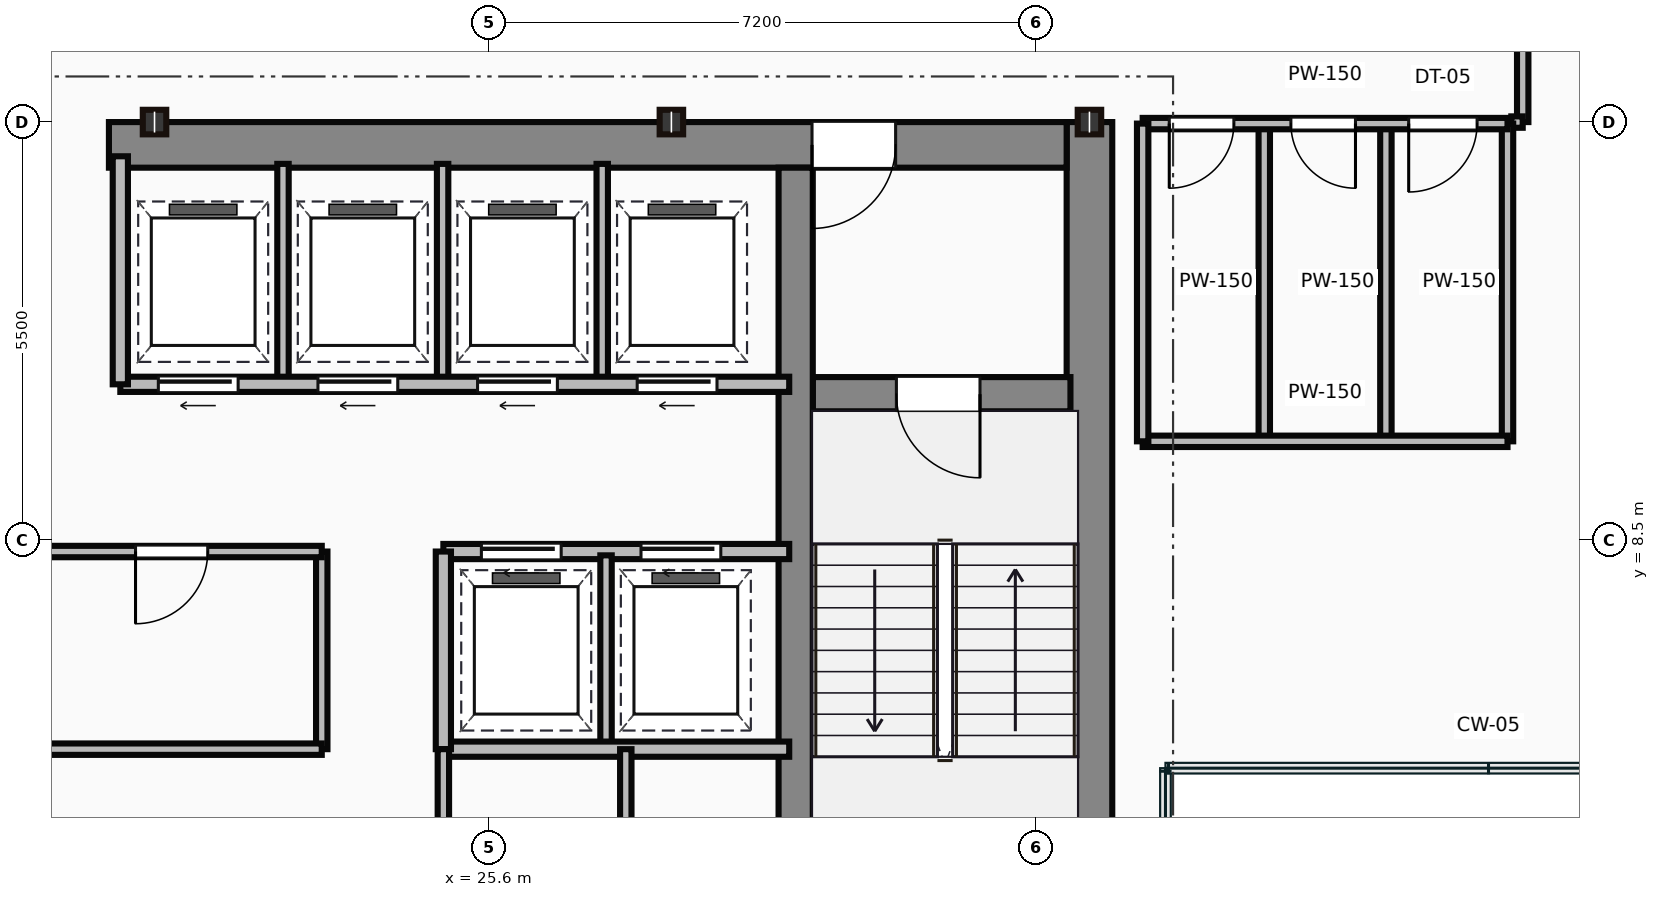
"""IFC4 building model, lengths in metres.
Left out: names, types, materials, properties, quantities, classifications, styles, units other than length and angle.
Written with IfcOpenShell. Run it as: python <this file> out.ifc"""

import sys

from ifc_helpers import new_model, si_unit, direction, frame, frame_2d, origin, origin_2d, place, context, subcontext, project, spatial, rectangle, i_section, extrude, source, transform, mapped, element, fill, save


model = new_model("IFC4")
c1 = context("Model", 3, precision=1e-05, world=origin(), true_north=direction((0.0, 1.0)))
c2 = subcontext(c1, "Body", "Model", "MODEL_VIEW")
j1 = project(units=[si_unit("LENGTHUNIT", "METRE"), si_unit("PLANEANGLEUNIT", "RADIAN")], contexts=[c1])
p1 = place(None, origin())
s1 = spatial("IfcSite", under=j1, at=p1, CompositionType="ELEMENT")
p2 = place(p1, origin())
s2 = spatial("IfcBuilding", under=s1, at=p2, CompositionType="ELEMENT")
p3 = place(p2, frame((0.0, 0.0, 269.75)))
s3 = spatial("IfcBuildingStorey", under=s2, at=p3, CompositionType="ELEMENT", Elevation=269.75)
m1 = source(origin(), c2, "Body", "SweptSolid", [
    extrude(rectangle(XDim=13.1, YDim=0.6, at=frame_2d((6.55, 0.0))), origin(), (0.0, 0.0, 1.0), 3.65),
])
p4 = place(p3, frame((33.5, 0.9, 0.0), z_axis=(0.0, 0.0, 1.0), x_axis=(0.0, 1.0, 0.0)))
e1 = element("IfcWall", 1, at=p4, inside=s3, PredefinedType="SHEAR", context=c2, shape_type="MappedRepresentation", body=[
    mapped(m1, transform((0.0, 0.0, 0.0))),
])
m2 = source(origin(), c2, "Body", "SweptSolid", [
    extrude(rectangle(XDim=12.6, YDim=0.6, at=frame_2d((6.3, 0.0))), origin(), (0.0, 0.0, 1.0), 3.65),
])
p5 = place(p3, frame((20.6, 13.7, 0.0), z_axis=(0.0, 0.0, 1.0), x_axis=(1.0, 0.0, 0.0)))
e2 = element("IfcWall", 2, at=p5, inside=s3, PredefinedType="SHEAR", context=c2, shape_type="MappedRepresentation", body=[
    mapped(m2, transform((0.0, 0.0, 0.0))),
])
p6 = place(p5, frame((9.25, 0.0, 0.0)))
e3 = element("IfcOpeningElement", 3, at=p6, cuts=e2, PredefinedType="OPENING", context=c2, shape_type="SweptSolid", body=[
    extrude(rectangle(XDim=1.1, YDim=2.15, at=frame_2d((0.55, 1.075))), frame((0.0, 0.31, 0.0), z_axis=(0.0, -1.0, 0.0), x_axis=(1.0, 0.0, 0.0)), (0.0, 0.0, 1.0), 0.62),
])
m3 = source(origin(), c2, "Body", "SweptSolid", [
    extrude(rectangle(XDim=12.5, YDim=0.45, at=frame_2d((6.25, 0.0))), origin(), (0.0, 0.0, 1.0), 3.65),
])
p7 = place(p3, frame((29.635, 0.9, 0.0), z_axis=(0.0, 0.0, 1.0), x_axis=(0.0, 1.0, 0.0)))
e4 = element("IfcWall", 4, at=p7, inside=s3, PredefinedType="SHEAR", context=c2, shape_type="MappedRepresentation", body=[
    mapped(m3, transform((0.0, 0.0, 0.0))),
])
m4 = source(origin(), c2, "Body", "SweptSolid", [
    extrude(rectangle(XDim=3.39, YDim=0.45, at=frame_2d((1.695, 0.0))), origin(), (0.0, 0.0, 1.0), 3.65),
])
p8 = place(p3, frame((29.86, 10.42, 0.0), z_axis=(0.0, 0.0, 1.0), x_axis=(1.0, 0.0, 0.0)))
e5 = element("IfcWall", 5, at=p8, inside=s3, PredefinedType="SHEAR", context=c2, shape_type="MappedRepresentation", body=[
    mapped(m4, transform((0.0, 0.0, 0.0))),
])
p9 = place(p8, frame((1.1, 0.0, 0.0)))
e6 = element("IfcOpeningElement", 6, at=p9, cuts=e5, PredefinedType="OPENING", context=c2, shape_type="SweptSolid", body=[
    extrude(rectangle(XDim=1.1, YDim=2.15, at=frame_2d((0.55, 1.075))), frame((0.0, 0.235, 0.0), z_axis=(0.0, -1.0, 0.0), x_axis=(1.0, 0.0, 0.0)), (0.0, 0.0, 1.0), 0.47),
])
m5 = source(origin(), c2, "Body", "SweptSolid", [
    extrude(i_section(OverallWidth=0.309, OverallDepth=0.323, WebThickness=0.014, FlangeThickness=0.023, at=origin_2d()), origin(), (0.0, 0.0, 1.0), 3.65),
])
for number, where, z_axis, x_axis in (
    (7, (21.2, 14.0, 0.0), (0.0, 0.0, 1.0), (1.0, 0.0, 0.0)),
    (8, (28.0, 14.0, 0.0), (0.0, 0.0, 1.0), (1.0, 0.0, 0.0)),
    (9, (33.5, 14.0, 0.0), (0.0, 0.0, 1.0), (1.0, 0.0, 0.0)),
):
    element("IfcColumn", number, at=place(p3, frame(where, z_axis=z_axis, x_axis=x_axis)), inside=s3, PredefinedType="COLUMN", context=c2, shape_type="MappedRepresentation", body=[
        mapped(m5, transform((0.0, 0.0, 0.0))),
    ])
m6 = source(origin(), c2, "Body", "SweptSolid", [
    extrude(rectangle(XDim=11.85, YDim=0.15, at=frame_2d((5.925, 0.0))), origin(), (0.0, 0.0, 1.0), 3.4),
])
p10 = place(p3, frame((11.55, 5.75, 0.0), z_axis=(0.0, 0.0, 1.0), x_axis=(1.0, 0.0, 0.0)))
e10 = element("IfcWall", 10, at=p10, inside=s3, PredefinedType="PARTITIONING", context=c2, shape_type="MappedRepresentation", body=[
    mapped(m6, transform((0.0, 0.0, 0.0))),
])
p11 = place(p3, frame((11.55, 8.35, 0.0), z_axis=(0.0, 0.0, 1.0), x_axis=(1.0, 0.0, 0.0)))
e11 = element("IfcWall", 11, at=p11, inside=s3, PredefinedType="PARTITIONING", context=c2, shape_type="MappedRepresentation", body=[
    mapped(m6, transform((0.0, 0.0, 0.0))),
])
p12 = place(p11, frame((1.1, 0.0, 0.0)))
e12 = element("IfcOpeningElement", 12, at=p12, cuts=e11, PredefinedType="OPENING", context=c2, shape_type="SweptSolid", body=[
    extrude(rectangle(XDim=0.95, YDim=2.15, at=frame_2d((0.475, 1.075))), frame((0.0, 0.085, 0.0), z_axis=(0.0, -1.0, 0.0), x_axis=(1.0, 0.0, 0.0)), (0.0, 0.0, 1.0), 0.17),
])
p13 = place(p11, frame((9.4, 0.0, 0.0)))
e13 = element("IfcOpeningElement", 13, at=p13, cuts=e11, PredefinedType="OPENING", context=c2, shape_type="SweptSolid", body=[
    extrude(rectangle(XDim=0.95, YDim=2.15, at=frame_2d((0.475, 1.075))), frame((0.0, 0.085, 0.0), z_axis=(0.0, -1.0, 0.0), x_axis=(1.0, 0.0, 0.0)), (0.0, 0.0, 1.0), 0.17),
])
m7 = source(origin(), c2, "Body", "SweptSolid", [
    extrude(rectangle(XDim=2.6, YDim=0.15, at=frame_2d((1.3, 0.0))), origin(), (0.0, 0.0, 1.0), 3.4),
])
p14 = place(p3, frame((23.4, 5.75, 0.0), z_axis=(0.0, 0.0, 1.0), x_axis=(0.0, 1.0, 0.0)))
e14 = element("IfcWall", 14, at=p14, inside=s3, PredefinedType="PARTITIONING", context=c2, shape_type="MappedRepresentation", body=[
    mapped(m7, transform((0.0, 0.0, 0.0))),
])
m8 = source(origin(), c2, "Body", "SweptSolid", [
    extrude(rectangle(XDim=8.8, YDim=0.2, at=frame_2d((4.4, 0.0))), origin(), (0.0, 0.0, 1.0), 3.4),
])
p15 = place(p3, frame((20.75, 10.55, 0.0), z_axis=(0.0, 0.0, 1.0), x_axis=(1.0, 0.0, 0.0)))
e15 = element("IfcWall", 15, at=p15, inside=s3, PredefinedType="PARTITIONING", context=c2, shape_type="MappedRepresentation", body=[
    mapped(m8, transform((0.0, 0.0, 0.0))),
])
p16 = place(p15, frame((0.5, 0.0, 0.0)))
e16 = element("IfcOpeningElement", 16, at=p16, cuts=e15, PredefinedType="OPENING", context=c2, shape_type="SweptSolid", body=[
    extrude(rectangle(XDim=1.05, YDim=2.15, at=frame_2d((0.525, 1.075))), frame((0.0, 0.11, 0.0), z_axis=(0.0, -1.0, 0.0), x_axis=(1.0, 0.0, 0.0)), (0.0, 0.0, 1.0), 0.22),
])
p17 = place(p15, frame((2.6, 0.0, 0.0)))
e17 = element("IfcOpeningElement", 17, at=p17, cuts=e15, PredefinedType="OPENING", context=c2, shape_type="SweptSolid", body=[
    extrude(rectangle(XDim=1.05, YDim=2.15, at=frame_2d((0.525, 1.075))), frame((0.0, 0.11, 0.0), z_axis=(0.0, -1.0, 0.0), x_axis=(1.0, 0.0, 0.0)), (0.0, 0.0, 1.0), 0.22),
])
p18 = place(p15, frame((4.7, 0.0, 0.0)))
e18 = element("IfcOpeningElement", 18, at=p18, cuts=e15, PredefinedType="OPENING", context=c2, shape_type="SweptSolid", body=[
    extrude(rectangle(XDim=1.05, YDim=2.15, at=frame_2d((0.525, 1.075))), frame((0.0, 0.11, 0.0), z_axis=(0.0, -1.0, 0.0), x_axis=(1.0, 0.0, 0.0)), (0.0, 0.0, 1.0), 0.22),
])
p19 = place(p15, frame((6.8, 0.0, 0.0)))
e19 = element("IfcOpeningElement", 19, at=p19, cuts=e15, PredefinedType="OPENING", context=c2, shape_type="SweptSolid", body=[
    extrude(rectangle(XDim=1.05, YDim=2.15, at=frame_2d((0.525, 1.075))), frame((0.0, 0.11, 0.0), z_axis=(0.0, -1.0, 0.0), x_axis=(1.0, 0.0, 0.0)), (0.0, 0.0, 1.0), 0.22),
])
m9 = source(origin(), c2, "Body", "SweptSolid", [
    extrude(rectangle(XDim=3.0, YDim=0.2, at=frame_2d((1.5, 0.0))), origin(), (0.0, 0.0, 1.0), 3.4),
])
p20 = place(p3, frame((20.75, 10.55, 0.0), z_axis=(0.0, 0.0, 1.0), x_axis=(0.0, 1.0, 0.0)))
e20 = element("IfcWall", 20, at=p20, inside=s3, PredefinedType="PARTITIONING", context=c2, shape_type="MappedRepresentation", body=[
    mapped(m9, transform((0.0, 0.0, 0.0))),
])
m10 = source(origin(), c2, "Body", "SweptSolid", [
    extrude(rectangle(XDim=2.85, YDim=0.15, at=frame_2d((1.425, 0.0))), origin(), (0.0, 0.0, 1.0), 3.4),
])
for number, where, z_axis, x_axis in (
    (21, (22.89, 10.6, 0.0), (0.0, 0.0, 1.0), (0.0, 1.0, 0.0)),
    (22, (24.99, 10.6, 0.0), (0.0, 0.0, 1.0), (0.0, 1.0, 0.0)),
    (23, (27.09, 10.6, 0.0), (0.0, 0.0, 1.0), (0.0, 1.0, 0.0)),
):
    element("IfcWall", number, at=place(p3, frame(where, z_axis=z_axis, x_axis=x_axis)), inside=s3, PredefinedType="PARTITIONING", context=c2, shape_type="MappedRepresentation", body=[
        mapped(m10, transform((0.0, 0.0, 0.0))),
    ])
m11 = source(origin(), c2, "Body", "SweptSolid", [
    extrude(rectangle(XDim=4.55, YDim=0.2, at=frame_2d((2.275, 0.0))), origin(), (0.0, 0.0, 1.0), 3.4),
])
p21 = place(p3, frame((25.0, 8.35, 0.0), z_axis=(0.0, 0.0, 1.0), x_axis=(1.0, 0.0, 0.0)))
e24 = element("IfcWall", 24, at=p21, inside=s3, PredefinedType="PARTITIONING", context=c2, shape_type="MappedRepresentation", body=[
    mapped(m11, transform((0.0, 0.0, 0.0))),
])
p22 = place(p21, frame((0.5, 0.0, 0.0)))
e25 = element("IfcOpeningElement", 25, at=p22, cuts=e24, PredefinedType="OPENING", context=c2, shape_type="SweptSolid", body=[
    extrude(rectangle(XDim=1.05, YDim=2.15, at=frame_2d((0.525, 1.075))), frame((0.0, 0.11, 0.0), z_axis=(0.0, -1.0, 0.0), x_axis=(1.0, 0.0, 0.0)), (0.0, 0.0, 1.0), 0.22),
])
p23 = place(p21, frame((2.6, 0.0, 0.0)))
e26 = element("IfcOpeningElement", 26, at=p23, cuts=e24, PredefinedType="OPENING", context=c2, shape_type="SweptSolid", body=[
    extrude(rectangle(XDim=1.05, YDim=2.15, at=frame_2d((0.525, 1.075))), frame((0.0, 0.11, 0.0), z_axis=(0.0, -1.0, 0.0), x_axis=(1.0, 0.0, 0.0)), (0.0, 0.0, 1.0), 0.22),
])
p24 = place(p3, frame((25.0, 5.75, 0.0), z_axis=(0.0, 0.0, 1.0), x_axis=(1.0, 0.0, 0.0)))
e27 = element("IfcWall", 27, at=p24, inside=s3, PredefinedType="PARTITIONING", context=c2, shape_type="MappedRepresentation", body=[
    mapped(m11, transform((0.0, 0.0, 0.0))),
])
m12 = source(origin(), c2, "Body", "SweptSolid", [
    extrude(rectangle(XDim=2.6, YDim=0.2, at=frame_2d((1.3, 0.0))), origin(), (0.0, 0.0, 1.0), 3.4),
])
p25 = place(p3, frame((25.0, 5.75, 0.0), z_axis=(0.0, 0.0, 1.0), x_axis=(0.0, 1.0, 0.0)))
e28 = element("IfcWall", 28, at=p25, inside=s3, PredefinedType="PARTITIONING", context=c2, shape_type="MappedRepresentation", body=[
    mapped(m12, transform((0.0, 0.0, 0.0))),
])
m13 = source(origin(), c2, "Body", "SweptSolid", [
    extrude(rectangle(XDim=2.5, YDim=0.15, at=frame_2d((1.25, 0.0))), origin(), (0.0, 0.0, 1.0), 3.4),
])
p26 = place(p3, frame((27.14, 5.8, 0.0), z_axis=(0.0, 0.0, 1.0), x_axis=(0.0, 1.0, 0.0)))
e29 = element("IfcWall", 29, at=p26, inside=s3, PredefinedType="PARTITIONING", context=c2, shape_type="MappedRepresentation", body=[
    mapped(m13, transform((0.0, 0.0, 0.0))),
])
m14 = source(origin(), c2, "Body", "SweptSolid", [
    extrude(rectangle(XDim=4.9, YDim=0.15, at=frame_2d((2.45, 0.0))), origin(), (0.0, 0.0, 1.0), 3.4),
])
p27 = place(p3, frame((25.0, 0.85, 0.0), z_axis=(0.0, 0.0, 1.0), x_axis=(0.0, 1.0, 0.0)))
e30 = element("IfcWall", 30, at=p27, inside=s3, PredefinedType="PARTITIONING", context=c2, shape_type="MappedRepresentation", body=[
    mapped(m14, transform((0.0, 0.0, 0.0))),
])
p28 = place(p27, frame((2.5, 0.0, 0.0)))
e31 = element("IfcOpeningElement", 31, at=p28, cuts=e30, PredefinedType="OPENING", context=c2, shape_type="SweptSolid", body=[
    extrude(rectangle(XDim=0.95, YDim=2.15, at=frame_2d((0.475, 1.075))), frame((0.0, 0.085, 0.0), z_axis=(0.0, -1.0, 0.0), x_axis=(1.0, 0.0, 0.0)), (0.0, 0.0, 1.0), 0.17),
])
m15 = source(origin(), c2, "Body", "SweptSolid", [
    extrude(rectangle(XDim=3.4, YDim=0.15, at=frame_2d((1.7, 0.0))), origin(), (0.0, 0.0, 1.0), 3.4),
])
p29 = place(p3, frame((27.4, 2.35, 0.0), z_axis=(0.0, 0.0, 1.0), x_axis=(0.0, 1.0, 0.0)))
e32 = element("IfcWall", 32, at=p29, inside=s3, PredefinedType="PARTITIONING", context=c2, shape_type="MappedRepresentation", body=[
    mapped(m15, transform((0.0, 0.0, 0.0))),
])
p30 = place(p29, frame((1.1, 0.0, 0.0)))
e33 = element("IfcOpeningElement", 33, at=p30, cuts=e32, PredefinedType="OPENING", context=c2, shape_type="SweptSolid", body=[
    extrude(rectangle(XDim=0.85, YDim=2.1, at=frame_2d((0.425, 1.05))), frame((0.0, 0.085, 0.0), z_axis=(0.0, -1.0, 0.0), x_axis=(1.0, 0.0, 0.0)), (0.0, 0.0, 1.0), 0.17),
])
m16 = source(origin(), c2, "Body", "SweptSolid", [
    extrude(rectangle(XDim=4.8, YDim=0.15, at=frame_2d((2.4, 0.0))), origin(), (0.0, 0.0, 1.0), 2.787),
])
p31 = place(p3, frame((34.2, 13.98, 0.0), z_axis=(0.0, 0.0, 1.0), x_axis=(1.0, 0.0, 0.0)))
e34 = element("IfcWall", 34, at=p31, inside=s3, PredefinedType="PARTITIONING", context=c2, shape_type="MappedRepresentation", body=[
    mapped(m16, transform((0.0, 0.0, 0.0))),
])
p32 = place(p31, frame((0.35, 0.0, 0.0)))
e35 = element("IfcOpeningElement", 35, at=p32, cuts=e34, PredefinedType="OPENING", context=c2, shape_type="SweptSolid", body=[
    extrude(rectangle(XDim=0.85, YDim=2.1, at=frame_2d((0.425, 1.05))), frame((0.0, 0.085, 0.0), z_axis=(0.0, -1.0, 0.0), x_axis=(1.0, 0.0, 0.0)), (0.0, 0.0, 1.0), 0.17),
])
p33 = place(p31, frame((1.95, 0.0, 0.0)))
e36 = element("IfcOpeningElement", 36, at=p33, cuts=e34, PredefinedType="OPENING", context=c2, shape_type="SweptSolid", body=[
    extrude(rectangle(XDim=0.85, YDim=2.1, at=frame_2d((0.425, 1.05))), frame((0.0, 0.085, 0.0), z_axis=(0.0, -1.0, 0.0), x_axis=(1.0, 0.0, 0.0)), (0.0, 0.0, 1.0), 0.17),
])
p34 = place(p31, frame((3.5, 0.0, 0.0)))
e37 = element("IfcOpeningElement", 37, at=p34, cuts=e34, PredefinedType="OPENING", context=c2, shape_type="SweptSolid", body=[
    extrude(rectangle(XDim=0.9, YDim=2.1, at=frame_2d((0.45, 1.05))), frame((0.0, 0.085, 0.0), z_axis=(0.0, -1.0, 0.0), x_axis=(1.0, 0.0, 0.0)), (0.0, 0.0, 1.0), 0.17),
])
m17 = source(origin(), c2, "Body", "SweptSolid", [
    extrude(rectangle(XDim=4.8, YDim=0.15, at=frame_2d((2.4, 0.0))), origin(), (0.0, 0.0, 1.0), 3.4),
])
p35 = place(p3, frame((34.2, 9.8, 0.0), z_axis=(0.0, 0.0, 1.0), x_axis=(1.0, 0.0, 0.0)))
e38 = element("IfcWall", 38, at=p35, inside=s3, PredefinedType="PARTITIONING", context=c2, shape_type="MappedRepresentation", body=[
    mapped(m17, transform((0.0, 0.0, 0.0))),
])
m18 = source(origin(), c2, "Body", "SweptSolid", [
    extrude(rectangle(XDim=4.18, YDim=0.15, at=frame_2d((2.09, 0.0))), origin(), (0.0, 0.0, 1.0), 3.4),
])
for number, where, z_axis, x_axis in (
    (39, (39.0, 9.8, 0.0), (0.0, 0.0, 1.0), (0.0, 1.0, 0.0)),
    (40, (34.2, 9.8, 0.0), (0.0, 0.0, 1.0), (0.0, 1.0, 0.0)),
    (41, (35.8, 9.8, 0.0), (0.0, 0.0, 1.0), (0.0, 1.0, 0.0)),
    (42, (37.4, 9.8, 0.0), (0.0, 0.0, 1.0), (0.0, 1.0, 0.0)),
):
    element("IfcWall", number, at=place(p3, frame(where, z_axis=z_axis, x_axis=x_axis)), inside=s3, PredefinedType="PARTITIONING", context=c2, shape_type="MappedRepresentation", body=[
        mapped(m18, transform((0.0, 0.0, 0.0))),
    ])
m19 = source(origin(), c2, "Body", "SweptSolid", [
    extrude(rectangle(XDim=2.2, YDim=0.15, at=frame_2d((1.1, 0.0))), origin(), (0.0, 0.0, 1.0), 3.4),
])
p36 = place(p3, frame((39.2, 16.2, 0.0), z_axis=(0.0, 0.0, 1.0), x_axis=(0.0, -1.0, 0.0)))
e43 = element("IfcWall", 43, at=p36, inside=s3, PredefinedType="PARTITIONING", context=c2, shape_type="MappedRepresentation", body=[
    mapped(m19, transform((0.0, 0.0, 0.0))),
])
m20 = source(origin(), c2, "Body", "SweptSolid", [
    extrude(rectangle(XDim=0.15, YDim=0.15, at=frame_2d((0.075, 0.0))), origin(), (0.0, 0.0, 1.0), 3.4),
])
p37 = place(p3, frame((39.2, 14.0, 0.0), z_axis=(0.0, 0.0, 1.0), x_axis=(-1.0, 0.0, 0.0)))
e44 = element("IfcWall", 44, at=p37, inside=s3, PredefinedType="PARTITIONING", context=c2, shape_type="MappedRepresentation", body=[
    mapped(m20, transform((0.0, 0.0, 0.0))),
])
m21 = source(origin(), c2, "Body", "SweptSolid", [
    extrude(rectangle(XDim=1.1, YDim=2.15, at=frame_2d((0.55, 1.075))), frame((0.0, 0.025, 0.0), z_axis=(0.0, -1.0, 0.0), x_axis=(1.0, 0.0, 0.0)), (0.0, 0.0, 1.0), 0.05),
])
p38 = place(p9, frame((1.1, 0.0, 0.0), z_axis=(0.0, 0.0, 1.0), x_axis=(-1.0, 0.0, 0.0)))
e45 = element("IfcDoor", 45, at=p38, inside=s3, OperationType="SINGLE_SWING_RIGHT", PredefinedType="DOOR", context=c2, shape_type="MappedRepresentation", body=[
    mapped(m21, transform((0.0, 0.0, 0.0))),
])
fill(e6, e45)
p39 = place(p6, origin())
e46 = element("IfcDoor", 46, at=p39, inside=s3, OperationType="SINGLE_SWING_LEFT", PredefinedType="DOOR", context=c2, shape_type="MappedRepresentation", body=[
    mapped(m21, transform((0.0, 0.0, 0.0))),
])
fill(e3, e46)
m22 = source(origin(), c2, "Body", "SweptSolid", [
    extrude(rectangle(XDim=0.95, YDim=2.15, at=frame_2d((0.475, 1.075))), frame((0.0, 0.025, 0.0), z_axis=(0.0, -1.0, 0.0), x_axis=(1.0, 0.0, 0.0)), (0.0, 0.0, 1.0), 0.05),
])
p40 = place(p13, origin())
e47 = element("IfcDoor", 47, at=p40, inside=s3, OperationType="SINGLE_SWING_LEFT", PredefinedType="DOOR", context=c2, shape_type="MappedRepresentation", body=[
    mapped(m22, transform((0.0, 0.0, 0.0))),
])
fill(e13, e47)
m23 = source(origin(), c2, "Body", "SweptSolid", [
    extrude(rectangle(XDim=1.05, YDim=2.15, at=frame_2d((0.525, 1.075))), frame((0.0, 0.025, 0.0), z_axis=(0.0, -1.0, 0.0), x_axis=(1.0, 0.0, 0.0)), (0.0, 0.0, 1.0), 0.05),
])
p41 = place(p16, frame((1.05, 0.0, 0.0), z_axis=(0.0, 0.0, 1.0), x_axis=(-1.0, 0.0, 0.0)))
e48 = element("IfcDoor", 48, at=p41, inside=s3, OperationType="SLIDING_TO_LEFT", PredefinedType="DOOR", context=c2, shape_type="MappedRepresentation", body=[
    mapped(m23, transform((0.0, 0.0, 0.0))),
])
fill(e16, e48)
p42 = place(p17, frame((1.05, 0.0, 0.0), z_axis=(0.0, 0.0, 1.0), x_axis=(-1.0, 0.0, 0.0)))
e49 = element("IfcDoor", 49, at=p42, inside=s3, OperationType="SLIDING_TO_LEFT", PredefinedType="DOOR", context=c2, shape_type="MappedRepresentation", body=[
    mapped(m23, transform((0.0, 0.0, 0.0))),
])
fill(e17, e49)
p43 = place(p18, frame((1.05, 0.0, 0.0), z_axis=(0.0, 0.0, 1.0), x_axis=(-1.0, 0.0, 0.0)))
e50 = element("IfcDoor", 50, at=p43, inside=s3, OperationType="SLIDING_TO_LEFT", PredefinedType="DOOR", context=c2, shape_type="MappedRepresentation", body=[
    mapped(m23, transform((0.0, 0.0, 0.0))),
])
fill(e18, e50)
p44 = place(p19, frame((1.05, 0.0, 0.0), z_axis=(0.0, 0.0, 1.0), x_axis=(-1.0, 0.0, 0.0)))
e51 = element("IfcDoor", 51, at=p44, inside=s3, OperationType="SLIDING_TO_LEFT", PredefinedType="DOOR", context=c2, shape_type="MappedRepresentation", body=[
    mapped(m23, transform((0.0, 0.0, 0.0))),
])
fill(e19, e51)
p45 = place(p22, origin())
e52 = element("IfcDoor", 52, at=p45, inside=s3, OperationType="SLIDING_TO_LEFT", PredefinedType="DOOR", context=c2, shape_type="MappedRepresentation", body=[
    mapped(m23, transform((0.0, 0.0, 0.0))),
])
fill(e25, e52)
p46 = place(p23, origin())
e53 = element("IfcDoor", 53, at=p46, inside=s3, OperationType="SLIDING_TO_LEFT", PredefinedType="DOOR", context=c2, shape_type="MappedRepresentation", body=[
    mapped(m23, transform((0.0, 0.0, 0.0))),
])
fill(e26, e53)
m24 = source(origin(), c2, "Body", "SweptSolid", [
    extrude(rectangle(XDim=0.85, YDim=2.1, at=frame_2d((0.425, 1.05))), frame((0.0, 0.025, 0.0), z_axis=(0.0, -1.0, 0.0), x_axis=(1.0, 0.0, 0.0)), (0.0, 0.0, 1.0), 0.05),
])
p47 = place(p32, frame((0.85, 0.0, 0.0), z_axis=(0.0, 0.0, 1.0), x_axis=(-1.0, 0.0, 0.0)))
e54 = element("IfcDoor", 54, at=p47, inside=s3, OperationType="SINGLE_SWING_LEFT", PredefinedType="DOOR", context=c2, shape_type="MappedRepresentation", body=[
    mapped(m24, transform((0.0, 0.0, 0.0))),
])
fill(e35, e54)
p48 = place(p33, frame((0.85, 0.0, 0.0), z_axis=(0.0, 0.0, 1.0), x_axis=(-1.0, 0.0, 0.0)))
e55 = element("IfcDoor", 55, at=p48, inside=s3, OperationType="SINGLE_SWING_RIGHT", PredefinedType="DOOR", context=c2, shape_type="MappedRepresentation", body=[
    mapped(m24, transform((0.0, 0.0, 0.0))),
])
fill(e36, e55)
m25 = source(origin(), c2, "Body", "SweptSolid", [
    extrude(rectangle(XDim=0.9, YDim=2.1, at=frame_2d((0.45, 1.05))), frame((0.0, 0.025, 0.0), z_axis=(0.0, -1.0, 0.0), x_axis=(1.0, 0.0, 0.0)), (0.0, 0.0, 1.0), 0.05),
])
p49 = place(p34, frame((0.9, 0.0, 0.0), z_axis=(0.0, 0.0, 1.0), x_axis=(-1.0, 0.0, 0.0)))
e56 = element("IfcDoor", 56, at=p49, inside=s3, OperationType="SINGLE_SWING_LEFT", PredefinedType="DOOR", context=c2, shape_type="MappedRepresentation", body=[
    mapped(m25, transform((0.0, 0.0, 0.0))),
])
fill(e37, e56)
save(model, sys.argv[1])
